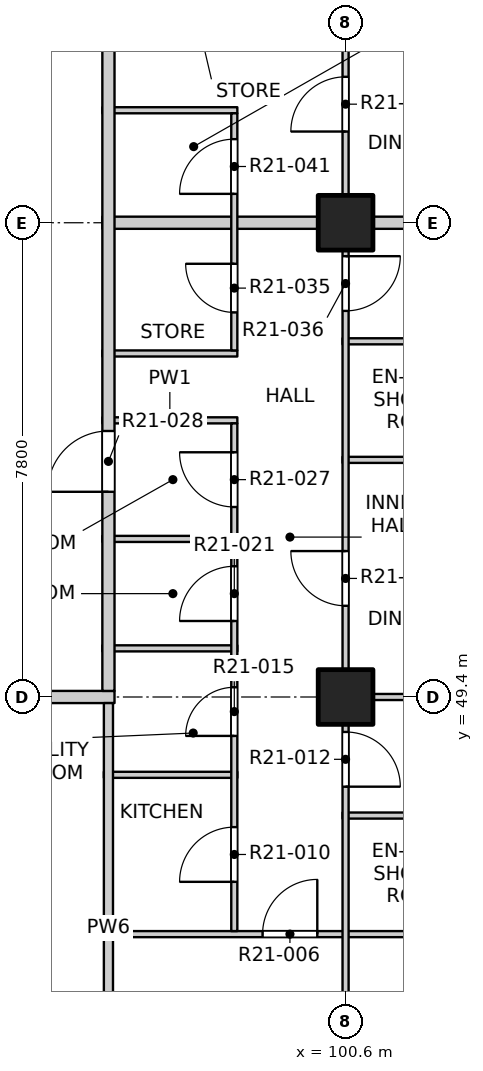
"""IFC4 building model, lengths in metres.
Left out: names, types, materials, properties, quantities, classifications, styles, units other than length and angle.
Written with IfcOpenShell. Run it as: python <this file> out.ifc"""

import sys

from ifc_helpers import new_model, si_unit, direction, frame, frame_2d, origin, origin_2d, place, context, subcontext, project, spatial, rectangle, extrude, element, fill, save


model = new_model("IFC4")
c1 = context("Model", 3, precision=1e-05, world=origin(), true_north=direction((0.0, 1.0)))
c2 = subcontext(c1, "Body", "Model", "MODEL_VIEW")
j1 = project(units=[si_unit("LENGTHUNIT", "METRE"), si_unit("PLANEANGLEUNIT", "RADIAN")], contexts=[c1])
p1 = place(None, origin())
s1 = spatial("IfcSite", under=j1, at=p1, CompositionType="ELEMENT")
p2 = place(p1, origin())
s2 = spatial("IfcBuilding", under=s1, at=p2, CompositionType="ELEMENT")
p3 = place(p2, frame((0.0, 0.0, 214.3)))
s3 = spatial("IfcBuildingStorey", under=s2, at=p3, CompositionType="ELEMENT", Elevation=214.3)
for number, where, z_axis, x_axis in (
    (1, (100.6, 49.4, -0.25), (0.0, 0.0, 1.0), (1.0, 0.0, 0.0)),
    (2, (100.6, 57.2, -0.25), (0.0, 0.0, 1.0), (1.0, 0.0, 0.0)),
):
    element("IfcColumn", number, at=place(p3, frame(where, z_axis=z_axis, x_axis=x_axis)), inside=s3, PredefinedType="COLUMN", context=c2, shape_type="SweptSolid", body=[
        extrude(rectangle(XDim=0.9, YDim=0.9, at=origin_2d()), origin(), (0.0, 0.0, 1.0), 3.4),
    ])
p4 = place(p3, frame((96.625, 45.5, 0.0), z_axis=(0.0, 0.0, 1.0), x_axis=(1.0, 0.0, 0.0)))
e3 = element("IfcWall", 3, at=p4, inside=s3, PredefinedType="PARTITIONING", context=c2, shape_type="SweptSolid", body=[
    extrude(rectangle(XDim=11.475, YDim=0.1, at=frame_2d((5.738, 0.0))), origin(), (0.0, 0.0, 1.0), 3.15),
])
p5 = place(p4, frame((2.61, 0.0, 0.0)))
e4 = element("IfcOpeningElement", 4, at=p5, cuts=e3, PredefinedType="OPENING", context=c2, shape_type="SweptSolid", body=[
    extrude(rectangle(XDim=0.9, YDim=2.1, at=frame_2d((0.45, 1.05))), frame((0.0, 0.06, 0.0), z_axis=(0.0, -1.0, 0.0), x_axis=(1.0, 0.0, 0.0)), (0.0, 0.0, 1.0), 0.12),
])
p6 = place(p3, frame((100.55, 47.45, 0.0), z_axis=(0.0, 0.0, 1.0), x_axis=(1.0, 0.0, 0.0)))
e5 = element("IfcWall", 5, at=p6, inside=s3, PredefinedType="PARTITIONING", context=c2, shape_type="SweptSolid", body=[
    extrude(rectangle(XDim=3.7, YDim=0.1, at=frame_2d((1.85, 0.0))), origin(), (0.0, 0.0, 1.0), 3.15),
])
p7 = place(p3, frame((96.625, 48.12, 0.0), z_axis=(0.0, 0.0, 1.0), x_axis=(1.0, 0.0, 0.0)))
e6 = element("IfcWall", 6, at=p7, inside=s3, PredefinedType="PARTITIONING", context=c2, shape_type="SweptSolid", body=[
    extrude(rectangle(XDim=2.195, YDim=0.1, at=frame_2d((1.098, 0.0))), origin(), (0.0, 0.0, 1.0), 3.15),
])
p8 = place(p3, frame((73.2, 49.4, 0.0), z_axis=(0.0, 0.0, 1.0), x_axis=(1.0, 0.0, 0.0)))
e7 = element("IfcWall", 7, at=p8, inside=s3, PredefinedType="PARTITIONING", context=c2, shape_type="SweptSolid", body=[
    extrude(rectangle(XDim=23.6, YDim=0.2, at=frame_2d((11.8, 0.0))), origin(), (0.0, 0.0, 1.0), 3.15),
])
p9 = place(p8, frame((1.6, 0.0, 0.0)))
e8 = element("IfcOpeningElement", 8, at=p9, cuts=e7, PredefinedType="OPENING", context=c2, shape_type="SweptSolid", body=[
    extrude(rectangle(XDim=0.9, YDim=2.1, at=frame_2d((0.45, 1.05))), frame((0.0, 0.11, 0.0), z_axis=(0.0, -1.0, 0.0), x_axis=(1.0, 0.0, 0.0)), (0.0, 0.0, 1.0), 0.22),
])
p10 = place(p8, frame((7.3, 0.0, 0.0)))
e9 = element("IfcOpeningElement", 9, at=p10, cuts=e7, PredefinedType="OPENING", context=c2, shape_type="SweptSolid", body=[
    extrude(rectangle(XDim=1.2, YDim=2.1, at=frame_2d((0.6, 1.05))), frame((0.0, 0.11, 0.0), z_axis=(0.0, -1.0, 0.0), x_axis=(1.0, 0.0, 0.0)), (0.0, 0.0, 1.0), 0.22),
])
p11 = place(p8, frame((13.3, 0.0, 0.0)))
e10 = element("IfcOpeningElement", 10, at=p11, cuts=e7, PredefinedType="OPENING", context=c2, shape_type="SweptSolid", body=[
    extrude(rectangle(XDim=0.9, YDim=2.1, at=frame_2d((0.45, 1.05))), frame((0.0, 0.11, 0.0), z_axis=(0.0, -1.0, 0.0), x_axis=(1.0, 0.0, 0.0)), (0.0, 0.0, 1.0), 0.22),
])
p12 = place(p8, frame((20.175, 0.0, 0.0)))
e11 = element("IfcOpeningElement", 11, at=p12, cuts=e7, PredefinedType="OPENING", context=c2, shape_type="SweptSolid", body=[
    extrude(rectangle(XDim=1.2, YDim=2.1, at=frame_2d((0.6, 1.05))), frame((0.0, 0.11, 0.0), z_axis=(0.0, -1.0, 0.0), x_axis=(1.0, 0.0, 0.0)), (0.0, 0.0, 1.0), 0.22),
])
p13 = place(p3, frame((100.55, 49.4, 0.0), z_axis=(0.0, 0.0, 1.0), x_axis=(1.0, 0.0, 0.0)))
e12 = element("IfcWall", 12, at=p13, inside=s3, PredefinedType="PARTITIONING", context=c2, shape_type="SweptSolid", body=[
    extrude(rectangle(XDim=7.55, YDim=0.1, at=frame_2d((3.775, 0.0))), origin(), (0.0, 0.0, 1.0), 3.15),
])
for number, where, z_axis, x_axis in (
    (13, (96.6, 50.2, 0.0), (0.0, 0.0, 1.0), (1.0, 0.0, 0.0)),
    (14, (96.6, 52.0, 0.0), (0.0, 0.0, 1.0), (1.0, 0.0, 0.0)),
):
    element("IfcWall", number, at=place(p3, frame(where, z_axis=z_axis, x_axis=x_axis)), inside=s3, PredefinedType="PARTITIONING", context=c2, shape_type="SweptSolid", body=[
        extrude(rectangle(XDim=2.22, YDim=0.1, at=frame_2d((1.11, 0.0))), origin(), (0.0, 0.0, 1.0), 3.15),
    ])
p14 = place(p3, frame((100.55, 53.3, 0.0), z_axis=(0.0, 0.0, 1.0), x_axis=(1.0, 0.0, 0.0)))
e15 = element("IfcWall", 15, at=p14, inside=s3, PredefinedType="PARTITIONING", context=c2, shape_type="SweptSolid", body=[
    extrude(rectangle(XDim=7.55, YDim=0.1, at=frame_2d((3.775, 0.0))), origin(), (0.0, 0.0, 1.0), 3.15),
])
for number, where, z_axis, x_axis in (
    (16, (96.6, 53.95, 0.0), (0.0, 0.0, 1.0), (1.0, 0.0, 0.0)),
    (17, (96.6, 55.05, 0.0), (0.0, 0.0, 1.0), (1.0, 0.0, 0.0)),
):
    element("IfcWall", number, at=place(p3, frame(where, z_axis=z_axis, x_axis=x_axis)), inside=s3, PredefinedType="PARTITIONING", context=c2, shape_type="SweptSolid", body=[
        extrude(rectangle(XDim=2.22, YDim=0.1, at=frame_2d((1.11, 0.0))), origin(), (0.0, 0.0, 1.0), 3.15),
    ])
p15 = place(p3, frame((100.55, 55.25, 0.0), z_axis=(0.0, 0.0, 1.0), x_axis=(1.0, 0.0, 0.0)))
e18 = element("IfcWall", 18, at=p15, inside=s3, PredefinedType="PARTITIONING", context=c2, shape_type="SweptSolid", body=[
    extrude(rectangle(XDim=3.7, YDim=0.1, at=frame_2d((1.85, 0.0))), origin(), (0.0, 0.0, 1.0), 3.15),
])
p16 = place(p3, frame((96.6, 57.2, 0.0), z_axis=(0.0, 0.0, 1.0), x_axis=(1.0, 0.0, 0.0)))
e19 = element("IfcWall", 19, at=p16, inside=s3, PredefinedType="PARTITIONING", context=c2, shape_type="SweptSolid", body=[
    extrude(rectangle(XDim=11.5, YDim=0.2, at=frame_2d((5.75, 0.0))), origin(), (0.0, 0.0, 1.0), 3.15),
])
p17 = place(p3, frame((96.6, 59.05, 0.0), z_axis=(0.0, 0.0, 1.0), x_axis=(1.0, 0.0, 0.0)))
e20 = element("IfcWall", 20, at=p17, inside=s3, PredefinedType="PARTITIONING", context=c2, shape_type="SweptSolid", body=[
    extrude(rectangle(XDim=2.22, YDim=0.1, at=frame_2d((1.11, 0.0))), origin(), (0.0, 0.0, 1.0), 3.15),
])
p18 = place(p3, frame((96.7, 41.9, 0.0), z_axis=(0.0, 0.0, 1.0), x_axis=(0.0, 1.0, 0.0)))
e21 = element("IfcWall", 21, at=p18, inside=s3, PredefinedType="PARTITIONING", context=c2, shape_type="SweptSolid", body=[
    extrude(rectangle(XDim=7.4, YDim=0.15, at=frame_2d((3.7, 0.0))), origin(), (0.0, 0.0, 1.0), 3.15),
])
p19 = place(p3, frame((96.7, 49.5, 0.0), z_axis=(0.0, 0.0, 1.0), x_axis=(0.0, 1.0, 0.0)))
e22 = element("IfcWall", 22, at=p19, inside=s3, PredefinedType="PARTITIONING", context=c2, shape_type="SweptSolid", body=[
    extrude(rectangle(XDim=34.9, YDim=0.2, at=frame_2d((17.45, 0.0))), origin(), (0.0, 0.0, 1.0), 3.15),
])
p20 = place(p19, frame((3.275, 0.0, 0.0)))
e23 = element("IfcOpeningElement", 23, at=p20, cuts=e22, PredefinedType="OPENING", context=c2, shape_type="SweptSolid", body=[
    extrude(rectangle(XDim=1.0, YDim=2.1, at=frame_2d((0.5, 1.05))), frame((0.0, 0.11, 0.0), z_axis=(0.0, -1.0, 0.0), x_axis=(1.0, 0.0, 0.0)), (0.0, 0.0, 1.0), 0.22),
])
p21 = place(p19, frame((10.825, 0.0, 0.0)))
e24 = element("IfcOpeningElement", 24, at=p21, cuts=e22, PredefinedType="OPENING", context=c2, shape_type="SweptSolid", body=[
    extrude(rectangle(XDim=1.0, YDim=2.1, at=frame_2d((0.5, 1.05))), frame((0.0, 0.11, 0.0), z_axis=(0.0, -1.0, 0.0), x_axis=(1.0, 0.0, 0.0)), (0.0, 0.0, 1.0), 0.22),
])
p22 = place(p19, frame((21.575, 0.0, 0.0)))
e25 = element("IfcOpeningElement", 25, at=p22, cuts=e22, PredefinedType="OPENING", context=c2, shape_type="SweptSolid", body=[
    extrude(rectangle(XDim=1.0, YDim=2.1, at=frame_2d((0.5, 1.05))), frame((0.0, 0.11, 0.0), z_axis=(0.0, -1.0, 0.0), x_axis=(1.0, 0.0, 0.0)), (0.0, 0.0, 1.0), 0.22),
])
p23 = place(p19, frame((30.575, 0.0, 0.0)))
e26 = element("IfcOpeningElement", 26, at=p23, cuts=e22, PredefinedType="OPENING", context=c2, shape_type="SweptSolid", body=[
    extrude(rectangle(XDim=1.0, YDim=2.1, at=frame_2d((0.5, 1.05))), frame((0.0, 0.11, 0.0), z_axis=(0.0, -1.0, 0.0), x_axis=(1.0, 0.0, 0.0)), (0.0, 0.0, 1.0), 0.22),
])
p24 = place(p3, frame((98.77, 45.55, 0.0), z_axis=(0.0, 0.0, 1.0), x_axis=(0.0, 1.0, 0.0)))
e27 = element("IfcWall", 27, at=p24, inside=s3, PredefinedType="PARTITIONING", context=c2, shape_type="SweptSolid", body=[
    extrude(rectangle(XDim=8.35, YDim=0.1, at=frame_2d((4.175, 0.0))), origin(), (0.0, 0.0, 1.0), 3.15),
])
p25 = place(p24, frame((0.81, 0.0, 0.0)))
e28 = element("IfcOpeningElement", 28, at=p25, cuts=e27, PredefinedType="OPENING", context=c2, shape_type="SweptSolid", body=[
    extrude(rectangle(XDim=0.9, YDim=2.1, at=frame_2d((0.45, 1.05))), frame((0.0, 0.06, 0.0), z_axis=(0.0, -1.0, 0.0), x_axis=(1.0, 0.0, 0.0)), (0.0, 0.0, 1.0), 0.12),
])
p26 = place(p24, frame((3.21, 0.0, 0.0)))
e29 = element("IfcOpeningElement", 29, at=p26, cuts=e27, PredefinedType="OPENING", context=c2, shape_type="SweptSolid", body=[
    extrude(rectangle(XDim=0.8, YDim=2.1, at=frame_2d((0.4, 1.05))), frame((0.0, 0.06, 0.0), z_axis=(0.0, -1.0, 0.0), x_axis=(1.0, 0.0, 0.0)), (0.0, 0.0, 1.0), 0.12),
])
p27 = place(p24, frame((5.1, 0.0, 0.0)))
e30 = element("IfcOpeningElement", 30, at=p27, cuts=e27, PredefinedType="OPENING", context=c2, shape_type="SweptSolid", body=[
    extrude(rectangle(XDim=0.9, YDim=2.1, at=frame_2d((0.45, 1.05))), frame((0.0, 0.06, 0.0), z_axis=(0.0, -1.0, 0.0), x_axis=(1.0, 0.0, 0.0)), (0.0, 0.0, 1.0), 0.12),
])
p28 = place(p24, frame((6.975, 0.0, 0.0)))
e31 = element("IfcOpeningElement", 31, at=p28, cuts=e27, PredefinedType="OPENING", context=c2, shape_type="SweptSolid", body=[
    extrude(rectangle(XDim=0.9, YDim=2.1, at=frame_2d((0.45, 1.05))), frame((0.0, 0.06, 0.0), z_axis=(0.0, -1.0, 0.0), x_axis=(1.0, 0.0, 0.0)), (0.0, 0.0, 1.0), 0.12),
])
p29 = place(p3, frame((98.77, 55.1, 0.0), z_axis=(0.0, 0.0, 1.0), x_axis=(0.0, 1.0, 0.0)))
e32 = element("IfcWall", 32, at=p29, inside=s3, PredefinedType="PARTITIONING", context=c2, shape_type="SweptSolid", body=[
    extrude(rectangle(XDim=3.9, YDim=0.1, at=frame_2d((1.95, 0.0))), origin(), (0.0, 0.0, 1.0), 3.15),
])
p30 = place(p29, frame((0.625, 0.0, 0.0)))
e33 = element("IfcOpeningElement", 33, at=p30, cuts=e32, PredefinedType="OPENING", context=c2, shape_type="SweptSolid", body=[
    extrude(rectangle(XDim=0.8, YDim=2.1, at=frame_2d((0.4, 1.05))), frame((0.0, 0.06, 0.0), z_axis=(0.0, -1.0, 0.0), x_axis=(1.0, 0.0, 0.0)), (0.0, 0.0, 1.0), 0.12),
])
p31 = place(p29, frame((2.575, 0.0, 0.0)))
e34 = element("IfcOpeningElement", 34, at=p31, cuts=e32, PredefinedType="OPENING", context=c2, shape_type="SweptSolid", body=[
    extrude(rectangle(XDim=0.9, YDim=2.1, at=frame_2d((0.45, 1.05))), frame((0.0, 0.06, 0.0), z_axis=(0.0, -1.0, 0.0), x_axis=(1.0, 0.0, 0.0)), (0.0, 0.0, 1.0), 0.12),
])
p32 = place(p3, frame((100.6, 41.9, 0.0), z_axis=(0.0, 0.0, 1.0), x_axis=(0.0, 1.0, 0.0)))
e35 = element("IfcWall", 35, at=p32, inside=s3, PredefinedType="PARTITIONING", context=c2, shape_type="SweptSolid", body=[
    extrude(rectangle(XDim=46.2, YDim=0.1, at=frame_2d((23.1, 0.0))), origin(), (0.0, 0.0, 1.0), 3.15),
])
p33 = place(p32, frame((1.2, 0.0, 0.0)))
e36 = element("IfcOpeningElement", 36, at=p33, cuts=e35, PredefinedType="OPENING", context=c2, shape_type="SweptSolid", body=[
    extrude(rectangle(XDim=0.9, YDim=2.1, at=frame_2d((0.45, 1.05))), frame((0.0, 0.06, 0.0), z_axis=(0.0, -1.0, 0.0), x_axis=(1.0, 0.0, 0.0)), (0.0, 0.0, 1.0), 0.12),
])
p34 = place(p32, frame((6.025, 0.0, 0.0)))
e37 = element("IfcOpeningElement", 37, at=p34, cuts=e35, PredefinedType="OPENING", context=c2, shape_type="SweptSolid", body=[
    extrude(rectangle(XDim=0.9, YDim=2.1, at=frame_2d((0.45, 1.05))), frame((0.0, 0.06, 0.0), z_axis=(0.0, -1.0, 0.0), x_axis=(1.0, 0.0, 0.0)), (0.0, 0.0, 1.0), 0.12),
])
p35 = place(p32, frame((9.0, 0.0, 0.0)))
e38 = element("IfcOpeningElement", 38, at=p35, cuts=e35, PredefinedType="OPENING", context=c2, shape_type="SweptSolid", body=[
    extrude(rectangle(XDim=0.9, YDim=2.1, at=frame_2d((0.45, 1.05))), frame((0.0, 0.06, 0.0), z_axis=(0.0, -1.0, 0.0), x_axis=(1.0, 0.0, 0.0)), (0.0, 0.0, 1.0), 0.12),
])
p36 = place(p32, frame((13.85, 0.0, 0.0)))
e39 = element("IfcOpeningElement", 39, at=p36, cuts=e35, PredefinedType="OPENING", context=c2, shape_type="SweptSolid", body=[
    extrude(rectangle(XDim=0.9, YDim=2.1, at=frame_2d((0.45, 1.05))), frame((0.0, 0.06, 0.0), z_axis=(0.0, -1.0, 0.0), x_axis=(1.0, 0.0, 0.0)), (0.0, 0.0, 1.0), 0.12),
])
p37 = place(p32, frame((16.8, 0.0, 0.0)))
e40 = element("IfcOpeningElement", 40, at=p37, cuts=e35, PredefinedType="OPENING", context=c2, shape_type="SweptSolid", body=[
    extrude(rectangle(XDim=0.9, YDim=2.1, at=frame_2d((0.45, 1.05))), frame((0.0, 0.06, 0.0), z_axis=(0.0, -1.0, 0.0), x_axis=(1.0, 0.0, 0.0)), (0.0, 0.0, 1.0), 0.12),
])
p38 = place(p32, frame((21.625, 0.0, 0.0)))
e41 = element("IfcOpeningElement", 41, at=p38, cuts=e35, PredefinedType="OPENING", context=c2, shape_type="SweptSolid", body=[
    extrude(rectangle(XDim=0.9, YDim=2.1, at=frame_2d((0.45, 1.05))), frame((0.0, 0.06, 0.0), z_axis=(0.0, -1.0, 0.0), x_axis=(1.0, 0.0, 0.0)), (0.0, 0.0, 1.0), 0.12),
])
p39 = place(p32, frame((24.6, 0.0, 0.0)))
e42 = element("IfcOpeningElement", 42, at=p39, cuts=e35, PredefinedType="OPENING", context=c2, shape_type="SweptSolid", body=[
    extrude(rectangle(XDim=0.9, YDim=2.1, at=frame_2d((0.45, 1.05))), frame((0.0, 0.06, 0.0), z_axis=(0.0, -1.0, 0.0), x_axis=(1.0, 0.0, 0.0)), (0.0, 0.0, 1.0), 0.12),
])
p40 = place(p32, frame((29.425, 0.0, 0.0)))
e43 = element("IfcOpeningElement", 43, at=p40, cuts=e35, PredefinedType="OPENING", context=c2, shape_type="SweptSolid", body=[
    extrude(rectangle(XDim=0.9, YDim=2.1, at=frame_2d((0.45, 1.05))), frame((0.0, 0.06, 0.0), z_axis=(0.0, -1.0, 0.0), x_axis=(1.0, 0.0, 0.0)), (0.0, 0.0, 1.0), 0.12),
])
p41 = place(p32, frame((33.375, 0.0, 0.0)))
e44 = element("IfcOpeningElement", 44, at=p41, cuts=e35, PredefinedType="OPENING", context=c2, shape_type="SweptSolid", body=[
    extrude(rectangle(XDim=0.9, YDim=2.1, at=frame_2d((0.45, 1.05))), frame((0.0, 0.06, 0.0), z_axis=(0.0, -1.0, 0.0), x_axis=(1.0, 0.0, 0.0)), (0.0, 0.0, 1.0), 0.12),
])
p42 = place(p32, frame((36.3, 0.0, 0.0)))
e45 = element("IfcOpeningElement", 45, at=p42, cuts=e35, PredefinedType="OPENING", context=c2, shape_type="SweptSolid", body=[
    extrude(rectangle(XDim=0.9, YDim=2.1, at=frame_2d((0.45, 1.05))), frame((0.0, 0.06, 0.0), z_axis=(0.0, -1.0, 0.0), x_axis=(1.0, 0.0, 0.0)), (0.0, 0.0, 1.0), 0.12),
])
p43 = place(p32, frame((41.175, 0.0, 0.0)))
e46 = element("IfcOpeningElement", 46, at=p43, cuts=e35, PredefinedType="OPENING", context=c2, shape_type="SweptSolid", body=[
    extrude(rectangle(XDim=0.9, YDim=2.1, at=frame_2d((0.45, 1.05))), frame((0.0, 0.06, 0.0), z_axis=(0.0, -1.0, 0.0), x_axis=(1.0, 0.0, 0.0)), (0.0, 0.0, 1.0), 0.12),
])
p44 = place(p32, frame((44.1, 0.0, 0.0)))
e47 = element("IfcOpeningElement", 47, at=p44, cuts=e35, PredefinedType="OPENING", context=c2, shape_type="SweptSolid", body=[
    extrude(rectangle(XDim=0.9, YDim=2.1, at=frame_2d((0.45, 1.05))), frame((0.0, 0.06, 0.0), z_axis=(0.0, -1.0, 0.0), x_axis=(1.0, 0.0, 0.0)), (0.0, 0.0, 1.0), 0.12),
])
p45 = place(p5, origin())
e48 = element("IfcDoor", 48, at=p45, inside=s3, OperationType="SINGLE_SWING_RIGHT", PredefinedType="DOOR", context=c2, shape_type="SweptSolid", body=[
    extrude(rectangle(XDim=0.9, YDim=2.1, at=frame_2d((0.45, 1.05))), frame((0.0, 0.025, 0.0), z_axis=(0.0, -1.0, 0.0), x_axis=(1.0, 0.0, 0.0)), (0.0, 0.0, 1.0), 0.05),
])
fill(e4, e48)
p46 = place(p25, origin())
e49 = element("IfcDoor", 49, at=p46, inside=s3, OperationType="SINGLE_SWING_LEFT", PredefinedType="DOOR", context=c2, shape_type="SweptSolid", body=[
    extrude(rectangle(XDim=0.9, YDim=2.1, at=frame_2d((0.45, 1.05))), frame((0.0, 0.025, 0.0), z_axis=(0.0, -1.0, 0.0), x_axis=(1.0, 0.0, 0.0)), (0.0, 0.0, 1.0), 0.05),
])
fill(e28, e49)
p47 = place(p34, origin())
e50 = element("IfcDoor", 50, at=p47, inside=s3, OperationType="SINGLE_SWING_RIGHT", PredefinedType="DOOR", context=c2, shape_type="SweptSolid", body=[
    extrude(rectangle(XDim=0.9, YDim=2.1, at=frame_2d((0.45, 1.05))), frame((0.0, 0.025, 0.0), z_axis=(0.0, -1.0, 0.0), x_axis=(1.0, 0.0, 0.0)), (0.0, 0.0, 1.0), 0.05),
])
fill(e37, e50)
p48 = place(p26, origin())
e51 = element("IfcDoor", 51, at=p48, inside=s3, OperationType="SINGLE_SWING_LEFT", PredefinedType="DOOR", context=c2, shape_type="SweptSolid", body=[
    extrude(rectangle(XDim=0.8, YDim=2.1, at=frame_2d((0.4, 1.05))), frame((0.0, 0.025, 0.0), z_axis=(0.0, -1.0, 0.0), x_axis=(1.0, 0.0, 0.0)), (0.0, 0.0, 1.0), 0.05),
])
fill(e29, e51)
p49 = place(p27, origin())
e52 = element("IfcDoor", 52, at=p49, inside=s3, OperationType="SINGLE_SWING_LEFT", PredefinedType="DOOR", context=c2, shape_type="SweptSolid", body=[
    extrude(rectangle(XDim=0.9, YDim=2.1, at=frame_2d((0.45, 1.05))), frame((0.0, 0.025, 0.0), z_axis=(0.0, -1.0, 0.0), x_axis=(1.0, 0.0, 0.0)), (0.0, 0.0, 1.0), 0.05),
])
fill(e30, e52)
p50 = place(p35, origin())
e53 = element("IfcDoor", 53, at=p50, inside=s3, OperationType="SINGLE_SWING_RIGHT", PredefinedType="DOOR", context=c2, shape_type="SweptSolid", body=[
    extrude(rectangle(XDim=0.9, YDim=2.1, at=frame_2d((0.45, 1.05))), frame((0.0, 0.025, 0.0), z_axis=(0.0, -1.0, 0.0), x_axis=(1.0, 0.0, 0.0)), (0.0, 0.0, 1.0), 0.05),
])
fill(e38, e53)
p51 = place(p28, origin())
e54 = element("IfcDoor", 54, at=p51, inside=s3, OperationType="SINGLE_SWING_RIGHT", PredefinedType="DOOR", context=c2, shape_type="SweptSolid", body=[
    extrude(rectangle(XDim=0.9, YDim=2.1, at=frame_2d((0.45, 1.05))), frame((0.0, 0.025, 0.0), z_axis=(0.0, -1.0, 0.0), x_axis=(1.0, 0.0, 0.0)), (0.0, 0.0, 1.0), 0.05),
])
fill(e31, e54)
p52 = place(p20, origin())
e55 = element("IfcDoor", 55, at=p52, inside=s3, OperationType="SINGLE_SWING_RIGHT", PredefinedType="DOOR", context=c2, shape_type="SweptSolid", body=[
    extrude(rectangle(XDim=1.0, YDim=2.1, at=frame_2d((0.5, 1.05))), frame((0.0, 0.025, 0.0), z_axis=(0.0, -1.0, 0.0), x_axis=(1.0, 0.0, 0.0)), (0.0, 0.0, 1.0), 0.05),
])
fill(e23, e55)
p53 = place(p30, origin())
e56 = element("IfcDoor", 56, at=p53, inside=s3, OperationType="SINGLE_SWING_RIGHT", PredefinedType="DOOR", context=c2, shape_type="SweptSolid", body=[
    extrude(rectangle(XDim=0.8, YDim=2.1, at=frame_2d((0.4, 1.05))), frame((0.0, 0.025, 0.0), z_axis=(0.0, -1.0, 0.0), x_axis=(1.0, 0.0, 0.0)), (0.0, 0.0, 1.0), 0.05),
])
fill(e33, e56)
p54 = place(p36, origin())
e57 = element("IfcDoor", 57, at=p54, inside=s3, OperationType="SINGLE_SWING_LEFT", PredefinedType="DOOR", context=c2, shape_type="SweptSolid", body=[
    extrude(rectangle(XDim=0.9, YDim=2.1, at=frame_2d((0.45, 1.05))), frame((0.0, 0.025, 0.0), z_axis=(0.0, -1.0, 0.0), x_axis=(1.0, 0.0, 0.0)), (0.0, 0.0, 1.0), 0.05),
])
fill(e39, e57)
p55 = place(p31, origin())
e58 = element("IfcDoor", 58, at=p55, inside=s3, OperationType="SINGLE_SWING_LEFT", PredefinedType="DOOR", context=c2, shape_type="SweptSolid", body=[
    extrude(rectangle(XDim=0.9, YDim=2.1, at=frame_2d((0.45, 1.05))), frame((0.0, 0.025, 0.0), z_axis=(0.0, -1.0, 0.0), x_axis=(1.0, 0.0, 0.0)), (0.0, 0.0, 1.0), 0.05),
])
fill(e34, e58)
p56 = place(p37, origin())
e59 = element("IfcDoor", 59, at=p56, inside=s3, OperationType="SINGLE_SWING_LEFT", PredefinedType="DOOR", context=c2, shape_type="SweptSolid", body=[
    extrude(rectangle(XDim=0.9, YDim=2.1, at=frame_2d((0.45, 1.05))), frame((0.0, 0.025, 0.0), z_axis=(0.0, -1.0, 0.0), x_axis=(1.0, 0.0, 0.0)), (0.0, 0.0, 1.0), 0.05),
])
fill(e40, e59)
save(model, sys.argv[1])
